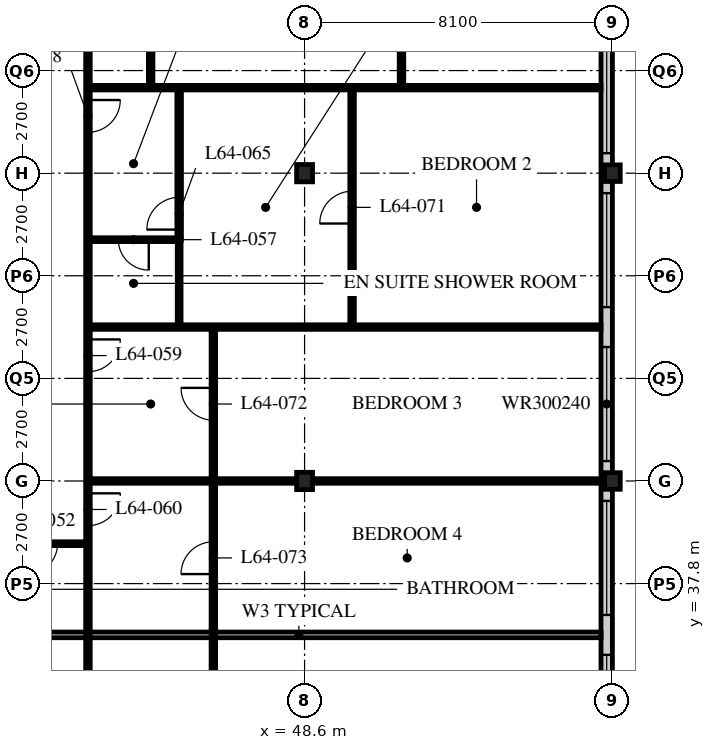
"""IFC4 building model, lengths in metres.
Left out: names, types, materials, properties, quantities, classifications, styles, units other than length and angle.
Written with IfcOpenShell. Run it as: python <this file> out.ifc"""

import sys

from ifc_helpers import new_model, si_unit, direction, frame, frame_2d, origin, origin_2d, place, context, subcontext, project, spatial, rectangle, i_section, extrude, element, fill, save


model = new_model("IFC4")
c1 = context("Model", 3, precision=1e-05, world=origin(), true_north=direction((0.0, 1.0)))
c2 = subcontext(c1, "Body", "Model", "MODEL_VIEW")
j1 = project(units=[si_unit("LENGTHUNIT", "METRE"), si_unit("PLANEANGLEUNIT", "RADIAN")], contexts=[c1])
p1 = place(None, origin())
s1 = spatial("IfcSite", under=j1, at=p1, CompositionType="ELEMENT")
p2 = place(p1, origin())
s2 = spatial("IfcBuilding", under=s1, at=p2, CompositionType="ELEMENT")
p3 = place(p2, frame((0.0, 0.0, 250.2)))
s3 = spatial("IfcBuildingStorey", under=s2, at=p3, CompositionType="ELEMENT", Elevation=250.2)
for number, where, z_axis, x_axis in (
    (1, (48.6, 40.5, 0.0), (0.0, 0.0, 1.0), (1.0, 0.0, 0.0)),
    (2, (48.6, 48.6, 0.0), (0.0, 0.0, 1.0), (1.0, 0.0, 0.0)),
):
    element("IfcColumn", number, at=place(p3, frame(where, z_axis=z_axis, x_axis=x_axis)), inside=s3, PredefinedType="COLUMN", context=c2, shape_type="SweptSolid", body=[
        extrude(i_section(OverallWidth=0.418, OverallDepth=0.456, WebThickness=0.042, FlangeThickness=0.067, FilletRadius=0.015, at=origin_2d()), origin(), (0.0, 0.0, 1.0), 3.9),
    ])
for number, where, z_axis, x_axis in (
    (3, (56.7, 40.5, 0.0), (0.0, 0.0, 1.0), (1.0, 0.0, 0.0)),
    (4, (56.7, 48.6, 0.0), (0.0, 0.0, 1.0), (1.0, 0.0, 0.0)),
):
    element("IfcColumn", number, at=place(p3, frame(where, z_axis=z_axis, x_axis=x_axis)), inside=s3, PredefinedType="COLUMN", context=c2, shape_type="SweptSolid", body=[
        extrude(i_section(OverallWidth=0.412, OverallDepth=0.437, WebThickness=0.036, FlangeThickness=0.058, FilletRadius=0.015, at=origin_2d()), origin(), (0.0, 0.0, 1.0), 3.9),
    ])
p4 = place(p3, frame((56.55, 24.6, 0.0), z_axis=(0.0, 0.0, 1.0), x_axis=(0.0, 1.0, 0.0)))
e5 = element("IfcWall", 5, at=p4, inside=s3, PredefinedType="SOLIDWALL", context=c2, shape_type="SweptSolid", body=[
    extrude(rectangle(XDim=32.1, YDim=0.3, at=frame_2d((16.05, 0.0))), origin(), (0.0, 0.0, 1.0), 3.69),
])
p5 = place(p4, frame((0.225, 0.0, 0.6)))
e6 = element("IfcOpeningElement", 6, at=p5, cuts=e5, PredefinedType="OPENING", context=c2, shape_type="SweptSolid", body=[
    extrude(rectangle(XDim=3.0, YDim=2.4, at=frame_2d((1.5, 1.2))), frame((0.0, 0.16, 0.0), z_axis=(0.0, -1.0, 0.0), x_axis=(1.0, 0.0, 0.0)), (0.0, 0.0, 1.0), 0.32),
])
p6 = place(p4, frame((4.275, 0.0, 0.6)))
e7 = element("IfcOpeningElement", 7, at=p6, cuts=e5, PredefinedType="OPENING", context=c2, shape_type="SweptSolid", body=[
    extrude(rectangle(XDim=3.0, YDim=2.4, at=frame_2d((1.5, 1.2))), frame((0.0, 0.16, 0.0), z_axis=(0.0, -1.0, 0.0), x_axis=(1.0, 0.0, 0.0)), (0.0, 0.0, 1.0), 0.32),
])
p7 = place(p4, frame((8.325, 0.0, 0.6)))
e8 = element("IfcOpeningElement", 8, at=p7, cuts=e5, PredefinedType="OPENING", context=c2, shape_type="SweptSolid", body=[
    extrude(rectangle(XDim=3.0, YDim=2.4, at=frame_2d((1.5, 1.2))), frame((0.0, 0.16, 0.0), z_axis=(0.0, -1.0, 0.0), x_axis=(1.0, 0.0, 0.0)), (0.0, 0.0, 1.0), 0.32),
])
p8 = place(p4, frame((12.375, 0.0, 0.6)))
e9 = element("IfcOpeningElement", 9, at=p8, cuts=e5, PredefinedType="OPENING", context=c2, shape_type="SweptSolid", body=[
    extrude(rectangle(XDim=3.0, YDim=2.4, at=frame_2d((1.5, 1.2))), frame((0.0, 0.16, 0.0), z_axis=(0.0, -1.0, 0.0), x_axis=(1.0, 0.0, 0.0)), (0.0, 0.0, 1.0), 0.32),
])
p9 = place(p4, frame((16.425, 0.0, 0.6)))
e10 = element("IfcOpeningElement", 10, at=p9, cuts=e5, PredefinedType="OPENING", context=c2, shape_type="SweptSolid", body=[
    extrude(rectangle(XDim=3.0, YDim=2.4, at=frame_2d((1.5, 1.2))), frame((0.0, 0.16, 0.0), z_axis=(0.0, -1.0, 0.0), x_axis=(1.0, 0.0, 0.0)), (0.0, 0.0, 1.0), 0.32),
])
p10 = place(p4, frame((20.475, 0.0, 0.6)))
e11 = element("IfcOpeningElement", 11, at=p10, cuts=e5, PredefinedType="OPENING", context=c2, shape_type="SweptSolid", body=[
    extrude(rectangle(XDim=3.0, YDim=2.4, at=frame_2d((1.5, 1.2))), frame((0.0, 0.16, 0.0), z_axis=(0.0, -1.0, 0.0), x_axis=(1.0, 0.0, 0.0)), (0.0, 0.0, 1.0), 0.32),
])
p11 = place(p4, frame((24.525, 0.0, 0.6)))
e12 = element("IfcOpeningElement", 12, at=p11, cuts=e5, PredefinedType="OPENING", context=c2, shape_type="SweptSolid", body=[
    extrude(rectangle(XDim=3.0, YDim=2.4, at=frame_2d((1.5, 1.2))), frame((0.0, 0.16, 0.0), z_axis=(0.0, -1.0, 0.0), x_axis=(1.0, 0.0, 0.0)), (0.0, 0.0, 1.0), 0.32),
])
p12 = place(p4, frame((28.575, 0.0, 0.6)))
e13 = element("IfcOpeningElement", 13, at=p12, cuts=e5, PredefinedType="OPENING", context=c2, shape_type="SweptSolid", body=[
    extrude(rectangle(XDim=3.0, YDim=2.4, at=frame_2d((1.5, 1.2))), frame((0.0, 0.16, 0.0), z_axis=(0.0, -1.0, 0.0), x_axis=(1.0, 0.0, 0.0)), (0.0, 0.0, 1.0), 0.32),
])
p13 = place(p3, frame((42.9, 22.5, 0.0), z_axis=(0.0, 0.0, 1.0), x_axis=(0.0, 1.0, 0.0)))
e14 = element("IfcWall", 14, at=p13, inside=s3, PredefinedType="PARTITIONING", context=c2, shape_type="SweptSolid", body=[
    extrude(rectangle(XDim=13.95, YDim=0.12, at=frame_2d((6.975, 0.0))), origin(), (0.0, 0.0, 1.0), 3.69),
])
p14 = place(p13, frame((2.125, 0.0, 0.0)))
e15 = element("IfcOpeningElement", 15, at=p14, cuts=e14, PredefinedType="OPENING", context=c2, shape_type="SweptSolid", body=[
    extrude(rectangle(XDim=0.85, YDim=2.1, at=frame_2d((0.425, 1.05))), frame((0.0, 0.07, 0.0), z_axis=(0.0, -1.0, 0.0), x_axis=(1.0, 0.0, 0.0)), (0.0, 0.0, 1.0), 0.14),
])
p15 = place(p13, frame((6.175, 0.0, 0.0)))
e16 = element("IfcOpeningElement", 16, at=p15, cuts=e14, PredefinedType="OPENING", context=c2, shape_type="SweptSolid", body=[
    extrude(rectangle(XDim=0.85, YDim=2.1, at=frame_2d((0.425, 1.05))), frame((0.0, 0.07, 0.0), z_axis=(0.0, -1.0, 0.0), x_axis=(1.0, 0.0, 0.0)), (0.0, 0.0, 1.0), 0.14),
])
p16 = place(p13, frame((10.225, 0.0, 0.0)))
e17 = element("IfcOpeningElement", 17, at=p16, cuts=e14, PredefinedType="OPENING", context=c2, shape_type="SweptSolid", body=[
    extrude(rectangle(XDim=0.85, YDim=2.1, at=frame_2d((0.425, 1.05))), frame((0.0, 0.07, 0.0), z_axis=(0.0, -1.0, 0.0), x_axis=(1.0, 0.0, 0.0)), (0.0, 0.0, 1.0), 0.14),
])
p17 = place(p3, frame((40.5, 36.45, 0.0), z_axis=(0.0, 0.0, 1.0), x_axis=(1.0, 0.0, 0.0)))
e18 = element("IfcWall", 18, at=p17, inside=s3, PredefinedType="PARTITIONING", context=c2, shape_type="SweptSolid", body=[
    extrude(rectangle(XDim=15.9, YDim=0.15, at=frame_2d((7.95, 0.0))), origin(), (0.0, 0.0, 1.0), 3.69),
])
p18 = place(p3, frame((40.5, 38.85, 0.0), z_axis=(0.0, 0.0, 1.0), x_axis=(1.0, 0.0, 0.0)))
e19 = element("IfcWall", 19, at=p18, inside=s3, PredefinedType="PARTITIONING", context=c2, shape_type="SweptSolid", body=[
    extrude(rectangle(XDim=2.4, YDim=0.1, at=frame_2d((1.2, 0.0))), origin(), (0.0, 0.0, 1.0), 3.69),
])
p19 = place(p18, frame((0.8, 0.0, 0.0)))
e20 = element("IfcOpeningElement", 20, at=p19, cuts=e19, PredefinedType="OPENING", context=c2, shape_type="SweptSolid", body=[
    extrude(rectangle(XDim=0.8, YDim=2.1, at=frame_2d((0.4, 1.05))), frame((0.0, 0.06, 0.0), z_axis=(0.0, -1.0, 0.0), x_axis=(1.0, 0.0, 0.0)), (0.0, 0.0, 1.0), 0.12),
])
p20 = place(p3, frame((42.9, 52.65, 0.0), z_axis=(0.0, 0.0, 1.0), x_axis=(0.0, -1.0, 0.0)))
e21 = element("IfcWall", 21, at=p20, inside=s3, PredefinedType="PARTITIONING", context=c2, shape_type="SweptSolid", body=[
    extrude(rectangle(XDim=16.2, YDim=0.12, at=frame_2d((8.1, 0.0))), origin(), (0.0, 0.0, 1.0), 3.69),
])
p21 = place(p20, frame((2.125, 0.0, 0.0)))
e22 = element("IfcOpeningElement", 22, at=p21, cuts=e21, PredefinedType="OPENING", context=c2, shape_type="SweptSolid", body=[
    extrude(rectangle(XDim=0.85, YDim=2.1, at=frame_2d((0.425, 1.05))), frame((0.0, 0.07, 0.0), z_axis=(0.0, -1.0, 0.0), x_axis=(1.0, 0.0, 0.0)), (0.0, 0.0, 1.0), 0.14),
])
p22 = place(p20, frame((8.425, 0.0, 0.0)))
e23 = element("IfcOpeningElement", 23, at=p22, cuts=e21, PredefinedType="OPENING", context=c2, shape_type="SweptSolid", body=[
    extrude(rectangle(XDim=0.85, YDim=2.1, at=frame_2d((0.425, 1.05))), frame((0.0, 0.07, 0.0), z_axis=(0.0, -1.0, 0.0), x_axis=(1.0, 0.0, 0.0)), (0.0, 0.0, 1.0), 0.14),
])
p23 = place(p20, frame((12.475, 0.0, 0.0)))
e24 = element("IfcOpeningElement", 24, at=p23, cuts=e21, PredefinedType="OPENING", context=c2, shape_type="SweptSolid", body=[
    extrude(rectangle(XDim=0.85, YDim=2.1, at=frame_2d((0.425, 1.05))), frame((0.0, 0.07, 0.0), z_axis=(0.0, -1.0, 0.0), x_axis=(1.0, 0.0, 0.0)), (0.0, 0.0, 1.0), 0.14),
])
p24 = place(p3, frame((42.9, 50.85, 0.0), z_axis=(0.0, 0.0, 1.0), x_axis=(1.0, 0.0, 0.0)))
e25 = element("IfcWall", 25, at=p24, inside=s3, PredefinedType="PARTITIONING", context=c2, shape_type="SweptSolid", body=[
    extrude(rectangle(XDim=13.5, YDim=0.12, at=frame_2d((6.75, 0.0))), origin(), (0.0, 0.0, 1.0), 3.69),
])
p25 = place(p3, frame((44.55, 64.5, 0.0), z_axis=(0.0, 0.0, 1.0), x_axis=(0.0, -1.0, 0.0)))
e26 = element("IfcWall", 26, at=p25, inside=s3, PredefinedType="PARTITIONING", context=c2, shape_type="SweptSolid", body=[
    extrude(rectangle(XDim=13.65, YDim=0.12, at=frame_2d((6.825, 0.0))), origin(), (0.0, 0.0, 1.0), 3.69),
])
p26 = place(p25, frame((8.425, 0.0, 0.0)))
e27 = element("IfcOpeningElement", 27, at=p26, cuts=e26, PredefinedType="OPENING", context=c2, shape_type="SweptSolid", body=[
    extrude(rectangle(XDim=0.85, YDim=2.1, at=frame_2d((0.425, 1.05))), frame((0.0, 0.07, 0.0), z_axis=(0.0, -1.0, 0.0), x_axis=(1.0, 0.0, 0.0)), (0.0, 0.0, 1.0), 0.14),
])
p27 = place(p25, frame((2.5, 0.0, 0.0)))
e28 = element("IfcOpeningElement", 28, at=p27, cuts=e26, PredefinedType="OPENING", context=c2, shape_type="SweptSolid", body=[
    extrude(rectangle(XDim=0.85, YDim=2.1, at=frame_2d((0.425, 1.05))), frame((0.0, 0.07, 0.0), z_axis=(0.0, -1.0, 0.0), x_axis=(1.0, 0.0, 0.0)), (0.0, 0.0, 1.0), 0.14),
])
p28 = place(p3, frame((42.9, 46.85, 0.0), z_axis=(0.0, 0.0, 1.0), x_axis=(1.0, 0.0, 0.0)))
e29 = element("IfcWall", 29, at=p28, inside=s3, PredefinedType="PARTITIONING", context=c2, shape_type="SweptSolid", body=[
    extrude(rectangle(XDim=2.4, YDim=0.1, at=frame_2d((1.2, 0.0))), origin(), (0.0, 0.0, 1.0), 3.69),
])
p29 = place(p28, frame((0.8, 0.0, 0.0)))
e30 = element("IfcOpeningElement", 30, at=p29, cuts=e29, PredefinedType="OPENING", context=c2, shape_type="SweptSolid", body=[
    extrude(rectangle(XDim=0.8, YDim=2.1, at=frame_2d((0.4, 1.05))), frame((0.0, 0.06, 0.0), z_axis=(0.0, -1.0, 0.0), x_axis=(1.0, 0.0, 0.0)), (0.0, 0.0, 1.0), 0.12),
])
p30 = place(p3, frame((45.3, 46.85, 0.0), z_axis=(0.0, 0.0, 1.0), x_axis=(0.0, -1.0, 0.0)))
e31 = element("IfcWall", 31, at=p30, inside=s3, PredefinedType="PARTITIONING", context=c2, shape_type="SweptSolid", body=[
    extrude(rectangle(XDim=2.3, YDim=0.1, at=frame_2d((1.15, 0.0))), origin(), (0.0, 0.0, 1.0), 3.69),
])
p31 = place(p3, frame((42.9, 44.55, 0.0), z_axis=(0.0, 0.0, 1.0), x_axis=(1.0, 0.0, 0.0)))
e32 = element("IfcWall", 32, at=p31, inside=s3, PredefinedType="PARTITIONING", context=c2, shape_type="SweptSolid", body=[
    extrude(rectangle(XDim=13.5, YDim=0.12, at=frame_2d((6.75, 0.0))), origin(), (0.0, 0.0, 1.0), 3.69),
])
p32 = place(p3, frame((42.9, 40.5, 0.0), z_axis=(0.0, 0.0, 1.0), x_axis=(1.0, 0.0, 0.0)))
e33 = element("IfcWall", 33, at=p32, inside=s3, PredefinedType="PARTITIONING", context=c2, shape_type="SweptSolid", body=[
    extrude(rectangle(XDim=13.5, YDim=0.12, at=frame_2d((6.75, 0.0))), origin(), (0.0, 0.0, 1.0), 3.078),
])
p33 = place(p3, frame((45.3, 50.85, 0.0), z_axis=(0.0, 0.0, 1.0), x_axis=(0.0, -1.0, 0.0)))
e34 = element("IfcWall", 34, at=p33, inside=s3, PredefinedType="PARTITIONING", context=c2, shape_type="SweptSolid", body=[
    extrude(rectangle(XDim=4.01, YDim=0.12, at=frame_2d((2.005, 0.0))), origin(), (0.0, 0.0, 1.0), 3.69),
])
p34 = place(p33, frame((2.885, 0.0, 0.0)))
e35 = element("IfcOpeningElement", 35, at=p34, cuts=e34, PredefinedType="OPENING", context=c2, shape_type="SweptSolid", body=[
    extrude(rectangle(XDim=0.85, YDim=2.1, at=frame_2d((0.425, 1.05))), frame((0.0, 0.07, 0.0), z_axis=(0.0, -1.0, 0.0), x_axis=(1.0, 0.0, 0.0)), (0.0, 0.0, 1.0), 0.14),
])
p35 = place(p3, frame((46.2, 28.35, 0.0), z_axis=(0.0, 0.0, 1.0), x_axis=(0.0, 1.0, 0.0)))
e36 = element("IfcWall", 36, at=p35, inside=s3, PredefinedType="PARTITIONING", context=c2, shape_type="SweptSolid", body=[
    extrude(rectangle(XDim=16.2, YDim=0.12, at=frame_2d((8.1, 0.0))), origin(), (0.0, 0.0, 1.0), 3.69),
])
p36 = place(p35, frame((1.6, 0.0, 0.0)))
e37 = element("IfcOpeningElement", 37, at=p36, cuts=e36, PredefinedType="OPENING", context=c2, shape_type="SweptSolid", body=[
    extrude(rectangle(XDim=0.85, YDim=2.1, at=frame_2d((0.425, 1.05))), frame((0.0, 0.07, 0.0), z_axis=(0.0, -1.0, 0.0), x_axis=(1.0, 0.0, 0.0)), (0.0, 0.0, 1.0), 0.14),
])
p37 = place(p35, frame((5.65, 0.0, 0.0)))
e38 = element("IfcOpeningElement", 38, at=p37, cuts=e36, PredefinedType="OPENING", context=c2, shape_type="SweptSolid", body=[
    extrude(rectangle(XDim=0.85, YDim=2.1, at=frame_2d((0.425, 1.05))), frame((0.0, 0.07, 0.0), z_axis=(0.0, -1.0, 0.0), x_axis=(1.0, 0.0, 0.0)), (0.0, 0.0, 1.0), 0.14),
])
p38 = place(p35, frame((13.75, 0.0, 0.0)))
e39 = element("IfcOpeningElement", 39, at=p38, cuts=e36, PredefinedType="OPENING", context=c2, shape_type="SweptSolid", body=[
    extrude(rectangle(XDim=0.85, YDim=2.1, at=frame_2d((0.425, 1.05))), frame((0.0, 0.07, 0.0), z_axis=(0.0, -1.0, 0.0), x_axis=(1.0, 0.0, 0.0)), (0.0, 0.0, 1.0), 0.14),
])
p39 = place(p35, frame((9.7, 0.0, 0.0)))
e40 = element("IfcOpeningElement", 40, at=p39, cuts=e36, PredefinedType="OPENING", context=c2, shape_type="SweptSolid", body=[
    extrude(rectangle(XDim=0.85, YDim=2.1, at=frame_2d((0.425, 1.05))), frame((0.0, 0.07, 0.0), z_axis=(0.0, -1.0, 0.0), x_axis=(1.0, 0.0, 0.0)), (0.0, 0.0, 1.0), 0.14),
])
p40 = place(p3, frame((51.15, 50.85, 0.0), z_axis=(0.0, 0.0, 1.0), x_axis=(0.0, 1.0, 0.0)))
e41 = element("IfcWall", 41, at=p40, inside=s3, PredefinedType="PARTITIONING", context=c2, shape_type="SweptSolid", body=[
    extrude(rectangle(XDim=7.8, YDim=0.12, at=frame_2d((3.9, 0.0))), origin(), (0.0, 0.0, 1.0), 3.69),
])
p41 = place(p40, frame((3.475, 0.0, 0.0)))
e42 = element("IfcOpeningElement", 42, at=p41, cuts=e41, PredefinedType="OPENING", context=c2, shape_type="SweptSolid", body=[
    extrude(rectangle(XDim=0.85, YDim=2.1, at=frame_2d((0.425, 1.05))), frame((0.0, 0.07, 0.0), z_axis=(0.0, -1.0, 0.0), x_axis=(1.0, 0.0, 0.0)), (0.0, 0.0, 1.0), 0.14),
])
p42 = place(p3, frame((49.85, 44.55, 0.0), z_axis=(0.0, 0.0, 1.0), x_axis=(0.0, 1.0, 0.0)))
e43 = element("IfcWall", 43, at=p42, inside=s3, PredefinedType="PARTITIONING", context=c2, shape_type="SweptSolid", body=[
    extrude(rectangle(XDim=6.3, YDim=0.12, at=frame_2d((3.15, 0.0))), origin(), (0.0, 0.0, 1.0), 3.69),
])
p43 = place(p42, frame((2.725, 0.0, 0.0)))
e44 = element("IfcOpeningElement", 44, at=p43, cuts=e43, PredefinedType="OPENING", context=c2, shape_type="SweptSolid", body=[
    extrude(rectangle(XDim=0.85, YDim=2.1, at=frame_2d((0.425, 1.05))), frame((0.0, 0.07, 0.0), z_axis=(0.0, -1.0, 0.0), x_axis=(1.0, 0.0, 0.0)), (0.0, 0.0, 1.0), 0.14),
])
p44 = place(p7, origin())
e45 = element("IfcWindow", 45, at=p44, inside=s3, PartitioningType="SINGLE_PANEL", PredefinedType="WINDOW", context=c2, shape_type="SweptSolid", body=[
    extrude(rectangle(XDim=3.0, YDim=2.4, at=frame_2d((1.5, 1.2))), frame((0.0, 0.03, 0.0), z_axis=(0.0, -1.0, 0.0), x_axis=(1.0, 0.0, 0.0)), (0.0, 0.0, 1.0), 0.06),
])
fill(e8, e45)
p45 = place(p8, origin())
e46 = element("IfcWindow", 46, at=p45, inside=s3, PartitioningType="SINGLE_PANEL", PredefinedType="WINDOW", context=c2, shape_type="SweptSolid", body=[
    extrude(rectangle(XDim=3.0, YDim=2.4, at=frame_2d((1.5, 1.2))), frame((0.0, 0.03, 0.0), z_axis=(0.0, -1.0, 0.0), x_axis=(1.0, 0.0, 0.0)), (0.0, 0.0, 1.0), 0.06),
])
fill(e9, e46)
p46 = place(p9, origin())
e47 = element("IfcWindow", 47, at=p46, inside=s3, PartitioningType="SINGLE_PANEL", PredefinedType="WINDOW", context=c2, shape_type="SweptSolid", body=[
    extrude(rectangle(XDim=3.0, YDim=2.4, at=frame_2d((1.5, 1.2))), frame((0.0, 0.03, 0.0), z_axis=(0.0, -1.0, 0.0), x_axis=(1.0, 0.0, 0.0)), (0.0, 0.0, 1.0), 0.06),
])
fill(e10, e47)
p47 = place(p10, origin())
e48 = element("IfcWindow", 48, at=p47, inside=s3, PartitioningType="SINGLE_PANEL", PredefinedType="WINDOW", context=c2, shape_type="SweptSolid", body=[
    extrude(rectangle(XDim=3.0, YDim=2.4, at=frame_2d((1.5, 1.2))), frame((0.0, 0.03, 0.0), z_axis=(0.0, -1.0, 0.0), x_axis=(1.0, 0.0, 0.0)), (0.0, 0.0, 1.0), 0.06),
])
fill(e11, e48)
p48 = place(p11, origin())
e49 = element("IfcWindow", 49, at=p48, inside=s3, PartitioningType="SINGLE_PANEL", PredefinedType="WINDOW", context=c2, shape_type="SweptSolid", body=[
    extrude(rectangle(XDim=3.0, YDim=2.4, at=frame_2d((1.5, 1.2))), frame((0.0, 0.03, 0.0), z_axis=(0.0, -1.0, 0.0), x_axis=(1.0, 0.0, 0.0)), (0.0, 0.0, 1.0), 0.06),
])
fill(e12, e49)
p49 = place(p19, origin())
e50 = element("IfcDoor", 50, at=p49, inside=s3, OperationType="SINGLE_SWING_RIGHT", PredefinedType="DOOR", context=c2, shape_type="SweptSolid", body=[
    extrude(rectangle(XDim=0.8, YDim=2.1, at=frame_2d((0.4, 1.05))), frame((0.0, 0.025, 0.0), z_axis=(0.0, -1.0, 0.0), x_axis=(1.0, 0.0, 0.0)), (0.0, 0.0, 1.0), 0.05),
])
fill(e20, e50)
p50 = place(p29, origin())
e51 = element("IfcDoor", 51, at=p50, inside=s3, OperationType="SINGLE_SWING_LEFT", PredefinedType="DOOR", context=c2, shape_type="SweptSolid", body=[
    extrude(rectangle(XDim=0.8, YDim=2.1, at=frame_2d((0.4, 1.05))), frame((0.0, 0.025, 0.0), z_axis=(0.0, -1.0, 0.0), x_axis=(1.0, 0.0, 0.0)), (0.0, 0.0, 1.0), 0.05),
])
fill(e30, e51)
p51 = place(p21, origin())
e52 = element("IfcDoor", 52, at=p51, inside=s3, OperationType="SINGLE_SWING_LEFT", PredefinedType="DOOR", context=c2, shape_type="SweptSolid", body=[
    extrude(rectangle(XDim=0.85, YDim=2.1, at=frame_2d((0.425, 1.05))), frame((0.0, 0.025, 0.0), z_axis=(0.0, -1.0, 0.0), x_axis=(1.0, 0.0, 0.0)), (0.0, 0.0, 1.0), 0.05),
])
fill(e22, e52)
p52 = place(p22, origin())
e53 = element("IfcDoor", 53, at=p52, inside=s3, OperationType="SINGLE_SWING_LEFT", PredefinedType="DOOR", context=c2, shape_type="SweptSolid", body=[
    extrude(rectangle(XDim=0.85, YDim=2.1, at=frame_2d((0.425, 1.05))), frame((0.0, 0.025, 0.0), z_axis=(0.0, -1.0, 0.0), x_axis=(1.0, 0.0, 0.0)), (0.0, 0.0, 1.0), 0.05),
])
fill(e23, e53)
p53 = place(p23, origin())
e54 = element("IfcDoor", 54, at=p53, inside=s3, OperationType="SINGLE_SWING_LEFT", PredefinedType="DOOR", context=c2, shape_type="SweptSolid", body=[
    extrude(rectangle(XDim=0.85, YDim=2.1, at=frame_2d((0.425, 1.05))), frame((0.0, 0.025, 0.0), z_axis=(0.0, -1.0, 0.0), x_axis=(1.0, 0.0, 0.0)), (0.0, 0.0, 1.0), 0.05),
])
fill(e24, e54)
p54 = place(p34, origin())
e55 = element("IfcDoor", 55, at=p54, inside=s3, OperationType="SINGLE_SWING_LEFT", PredefinedType="DOOR", context=c2, shape_type="SweptSolid", body=[
    extrude(rectangle(XDim=0.85, YDim=2.1, at=frame_2d((0.425, 1.05))), frame((0.0, 0.025, 0.0), z_axis=(0.0, -1.0, 0.0), x_axis=(1.0, 0.0, 0.0)), (0.0, 0.0, 1.0), 0.05),
])
fill(e35, e55)
p55 = place(p43, origin())
e56 = element("IfcDoor", 56, at=p55, inside=s3, OperationType="SINGLE_SWING_LEFT", PredefinedType="DOOR", context=c2, shape_type="SweptSolid", body=[
    extrude(rectangle(XDim=0.85, YDim=2.1, at=frame_2d((0.425, 1.05))), frame((0.0, 0.025, 0.0), z_axis=(0.0, -1.0, 0.0), x_axis=(1.0, 0.0, 0.0)), (0.0, 0.0, 1.0), 0.05),
])
fill(e44, e56)
p56 = place(p38, origin())
e57 = element("IfcDoor", 57, at=p56, inside=s3, OperationType="SINGLE_SWING_RIGHT", PredefinedType="DOOR", context=c2, shape_type="SweptSolid", body=[
    extrude(rectangle(XDim=0.85, YDim=2.1, at=frame_2d((0.425, 1.05))), frame((0.0, 0.025, 0.0), z_axis=(0.0, -1.0, 0.0), x_axis=(1.0, 0.0, 0.0)), (0.0, 0.0, 1.0), 0.05),
])
fill(e39, e57)
p57 = place(p39, origin())
e58 = element("IfcDoor", 58, at=p57, inside=s3, OperationType="SINGLE_SWING_LEFT", PredefinedType="DOOR", context=c2, shape_type="SweptSolid", body=[
    extrude(rectangle(XDim=0.85, YDim=2.1, at=frame_2d((0.425, 1.05))), frame((0.0, 0.025, 0.0), z_axis=(0.0, -1.0, 0.0), x_axis=(1.0, 0.0, 0.0)), (0.0, 0.0, 1.0), 0.05),
])
fill(e40, e58)
save(model, sys.argv[1])
